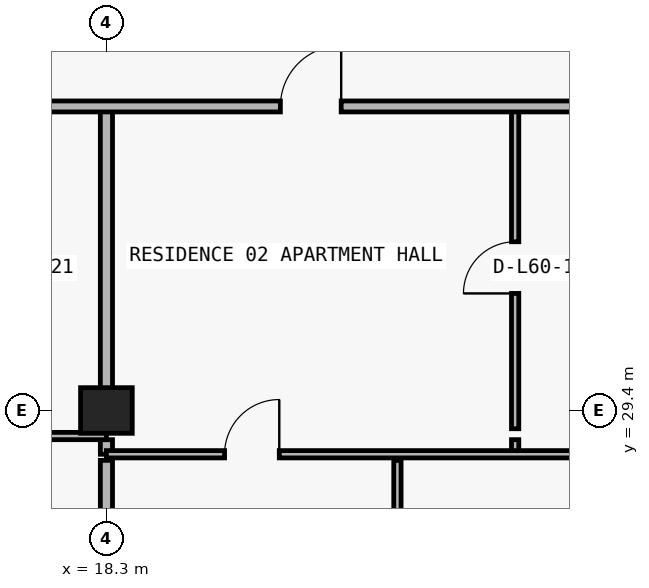
"""IFC4 building model, lengths in metres.
Left out: names, types, materials, properties, quantities, classifications, styles, units other than length and angle.
Written with IfcOpenShell. Run it as: python <this file> out.ifc"""

import sys

from ifc_helpers import new_model, si_unit, direction, frame, frame_2d, origin, origin_2d, place, context, subcontext, project, spatial, rectangle, extrude, element, fill, save


model = new_model("IFC4")
c1 = context("Model", 3, precision=1e-05, world=origin(), true_north=direction((0.0, 1.0)))
c2 = subcontext(c1, "Body", "Model", "MODEL_VIEW")
j1 = project(units=[si_unit("LENGTHUNIT", "METRE"), si_unit("PLANEANGLEUNIT", "RADIAN")], contexts=[c1])
p1 = place(None, origin())
s1 = spatial("IfcSite", under=j1, at=p1, CompositionType="ELEMENT")
p2 = place(p1, origin())
s2 = spatial("IfcBuilding", under=s1, at=p2, CompositionType="ELEMENT")
p3 = place(p2, frame((0.0, 0.0, 214.8)))
s3 = spatial("IfcBuildingStorey", under=s2, at=p3, CompositionType="ELEMENT", Elevation=214.8)
p4 = place(p3, frame((18.3, 29.4, 0.0), z_axis=(0.0, 0.0, 1.0), x_axis=(1.0, 0.0, 0.0)))
e1 = element("IfcColumn", 1, at=p4, inside=s3, PredefinedType="COLUMN", context=c2, shape_type="SweptSolid", body=[
    extrude(rectangle(XDim=0.85, YDim=0.75, at=origin_2d()), origin(), (0.0, 0.0, 1.0), 3.05),
])
p5 = place(p3, frame((18.3, 23.89, 0.0), z_axis=(0.0, 0.0, 1.0), x_axis=(0.0, 1.0, 0.0)))
e2 = element("IfcWall", 2, at=p5, inside=s3, PredefinedType="PARTITIONING", context=c2, shape_type="SweptSolid", body=[
    extrude(rectangle(XDim=4.69, YDim=0.2, at=frame_2d((2.345, 0.0))), origin(), (0.0, 0.0, 1.0), 2.263),
])
p6 = place(p3, frame((18.3, 28.68, 0.0), z_axis=(0.0, 0.0, 1.0), x_axis=(0.0, 1.0, 0.0)))
e3 = element("IfcWall", 3, at=p6, inside=s3, PredefinedType="PARTITIONING", context=c2, shape_type="SweptSolid", body=[
    extrude(rectangle(XDim=0.24, YDim=0.2, at=frame_2d((0.12, 0.0))), origin(), (0.0, 0.0, 1.0), 2.263),
])
p7 = place(p3, frame((18.3, 29.1, 0.0), z_axis=(0.0, 0.0, 1.0), x_axis=(0.0, 1.0, 0.0)))
e4 = element("IfcWall", 4, at=p7, inside=s3, PredefinedType="PARTITIONING", context=c2, shape_type="SweptSolid", body=[
    extrude(rectangle(XDim=5.3, YDim=0.2, at=frame_2d((2.65, 0.0))), origin(), (0.0, 0.0, 1.0), 2.263),
])
p8 = place(p3, frame((23.086, 23.89, 0.0), z_axis=(0.0, 0.0, 1.0), x_axis=(0.0, 1.0, 0.0)))
e5 = element("IfcWall", 5, at=p8, inside=s3, PredefinedType="PARTITIONING", context=c2, shape_type="SweptSolid", body=[
    extrude(rectangle(XDim=4.69, YDim=0.12, at=frame_2d((2.345, 0.0))), origin(), (0.0, 0.0, 1.0), 3.05),
])
p9 = place(p8, frame((1.895, 0.0, 0.0)))
e6 = element("IfcOpeningElement", 6, at=p9, cuts=e5, PredefinedType="OPENING", context=c2, shape_type="SweptSolid", body=[
    extrude(rectangle(XDim=0.9, YDim=2.15, at=frame_2d((0.45, 1.075))), frame((0.0, 0.07, 0.0), z_axis=(0.0, -1.0, 0.0), x_axis=(1.0, 0.0, 0.0)), (0.0, 0.0, 1.0), 0.14),
])
p10 = place(p3, frame((25.022, 28.68, 0.0), z_axis=(0.0, 0.0, 1.0), x_axis=(0.0, 1.0, 0.0)))
e7 = element("IfcWall", 7, at=p10, inside=s3, PredefinedType="PARTITIONING", context=c2, shape_type="SweptSolid", body=[
    extrude(rectangle(XDim=0.24, YDim=0.12, at=frame_2d((0.12, 0.0))), origin(), (0.0, 0.0, 1.0), 3.05),
])
p11 = place(p3, frame((25.022, 29.1, 0.0), z_axis=(0.0, 0.0, 1.0), x_axis=(0.0, 1.0, 0.0)))
e8 = element("IfcWall", 8, at=p11, inside=s3, PredefinedType="PARTITIONING", context=c2, shape_type="SweptSolid", body=[
    extrude(rectangle(XDim=5.3, YDim=0.12, at=frame_2d((2.65, 0.0))), origin(), (0.0, 0.0, 1.0), 3.05),
])
p12 = place(p11, frame((2.225, 0.0, 0.0)))
e9 = element("IfcOpeningElement", 9, at=p12, cuts=e8, PredefinedType="OPENING", context=c2, shape_type="SweptSolid", body=[
    extrude(rectangle(XDim=0.85, YDim=2.1, at=frame_2d((0.425, 1.05))), frame((0.0, 0.07, 0.0), z_axis=(0.0, -1.0, 0.0), x_axis=(1.0, 0.0, 0.0)), (0.0, 0.0, 1.0), 0.14),
])
p13 = place(p3, frame((18.3, 28.68, 0.0), z_axis=(0.0, 0.0, 1.0), x_axis=(1.0, 0.0, 0.0)))
e10 = element("IfcWall", 10, at=p13, inside=s3, PredefinedType="PARTITIONING", context=c2, shape_type="SweptSolid", body=[
    extrude(rectangle(XDim=8.18, YDim=0.12, at=frame_2d((4.09, 0.0))), origin(), (0.0, 0.0, 1.0), 3.05),
])
p14 = place(p13, frame((1.943, 0.0, 0.0)))
e11 = element("IfcOpeningElement", 11, at=p14, cuts=e10, PredefinedType="OPENING", context=c2, shape_type="SweptSolid", body=[
    extrude(rectangle(XDim=0.9, YDim=2.15, at=frame_2d((0.45, 1.075))), frame((0.0, 0.07, 0.0), z_axis=(0.0, -1.0, 0.0), x_axis=(1.0, 0.0, 0.0)), (0.0, 0.0, 1.0), 0.14),
])
p15 = place(p3, frame((10.1, 28.98, 0.0), z_axis=(0.0, 0.0, 1.0), x_axis=(1.0, 0.0, 0.0)))
e12 = element("IfcWall", 12, at=p15, inside=s3, PredefinedType="PARTITIONING", context=c2, shape_type="SweptSolid", body=[
    extrude(rectangle(XDim=8.2, YDim=0.12, at=frame_2d((4.1, 0.0))), origin(), (0.0, 0.0, 1.0), 3.05),
])
p16 = place(p15, frame((1.764, 0.0, 0.0)))
e13 = element("IfcOpeningElement", 13, at=p16, cuts=e12, PredefinedType="OPENING", context=c2, shape_type="SweptSolid", body=[
    extrude(rectangle(XDim=0.9, YDim=2.15, at=frame_2d((0.45, 1.075))), frame((0.0, 0.07, 0.0), z_axis=(0.0, -1.0, 0.0), x_axis=(1.0, 0.0, 0.0)), (0.0, 0.0, 1.0), 0.14),
])
p17 = place(p3, frame((10.105, 34.4, 0.0), z_axis=(0.0, 0.0, 1.0), x_axis=(1.0, 0.0, 0.0)))
e14 = element("IfcWall", 14, at=p17, inside=s3, PredefinedType="PARTITIONING", context=c2, shape_type="SweptSolid", body=[
    extrude(rectangle(XDim=29.099, YDim=0.18, at=frame_2d((14.55, 0.0))), origin(), (0.0, 0.0, 1.0), 3.05),
])
p18 = place(p17, frame((2.647, 0.0, 0.0)))
e15 = element("IfcOpeningElement", 15, at=p18, cuts=e14, PredefinedType="OPENING", context=c2, shape_type="SweptSolid", body=[
    extrude(rectangle(XDim=1.0, YDim=2.2, at=frame_2d((0.5, 1.1))), frame((0.0, 0.1, 0.0), z_axis=(0.0, -1.0, 0.0), x_axis=(1.0, 0.0, 0.0)), (0.0, 0.0, 1.0), 0.2),
])
p19 = place(p17, frame((11.056, 0.0, 0.0)))
e16 = element("IfcOpeningElement", 16, at=p19, cuts=e14, PredefinedType="OPENING", context=c2, shape_type="SweptSolid", body=[
    extrude(rectangle(XDim=1.0, YDim=2.2, at=frame_2d((0.5, 1.1))), frame((0.0, 0.1, 0.0), z_axis=(0.0, -1.0, 0.0), x_axis=(1.0, 0.0, 0.0)), (0.0, 0.0, 1.0), 0.2),
])
p20 = place(p17, frame((19.334, 0.0, 0.0)))
e17 = element("IfcOpeningElement", 17, at=p20, cuts=e14, PredefinedType="OPENING", context=c2, shape_type="SweptSolid", body=[
    extrude(rectangle(XDim=1.0, YDim=2.2, at=frame_2d((0.5, 1.1))), frame((0.0, 0.1, 0.0), z_axis=(0.0, -1.0, 0.0), x_axis=(1.0, 0.0, 0.0)), (0.0, 0.0, 1.0), 0.2),
])
p21 = place(p17, frame((26.547, 0.0, 0.0)))
e18 = element("IfcOpeningElement", 18, at=p21, cuts=e14, PredefinedType="OPENING", context=c2, shape_type="SweptSolid", body=[
    extrude(rectangle(XDim=1.0, YDim=2.2, at=frame_2d((0.5, 1.1))), frame((0.0, 0.1, 0.0), z_axis=(0.0, -1.0, 0.0), x_axis=(1.0, 0.0, 0.0)), (0.0, 0.0, 1.0), 0.2),
])
p22 = place(p19, origin())
e19 = element("IfcDoor", 19, at=p22, inside=s3, OperationType="SINGLE_SWING_RIGHT", PredefinedType="DOOR", context=c2, shape_type="SweptSolid", body=[
    extrude(rectangle(XDim=1.0, YDim=2.2, at=frame_2d((0.5, 1.1))), frame((0.0, 0.025, 0.0), z_axis=(0.0, -1.0, 0.0), x_axis=(1.0, 0.0, 0.0)), (0.0, 0.0, 1.0), 0.05),
])
fill(e16, e19)
p23 = place(p12, origin())
e20 = element("IfcDoor", 20, at=p23, inside=s3, OperationType="SINGLE_SWING_LEFT", PredefinedType="DOOR", context=c2, shape_type="SweptSolid", body=[
    extrude(rectangle(XDim=0.85, YDim=2.1, at=frame_2d((0.425, 1.05))), frame((0.0, 0.025, 0.0), z_axis=(0.0, -1.0, 0.0), x_axis=(1.0, 0.0, 0.0)), (0.0, 0.0, 1.0), 0.05),
])
fill(e9, e20)
p24 = place(p14, origin())
e21 = element("IfcDoor", 21, at=p24, inside=s3, OperationType="SINGLE_SWING_RIGHT", PredefinedType="DOOR", context=c2, shape_type="SweptSolid", body=[
    extrude(rectangle(XDim=0.9, YDim=2.15, at=frame_2d((0.45, 1.075))), frame((0.0, 0.025, 0.0), z_axis=(0.0, -1.0, 0.0), x_axis=(1.0, 0.0, 0.0)), (0.0, 0.0, 1.0), 0.05),
])
fill(e11, e21)
save(model, sys.argv[1])
